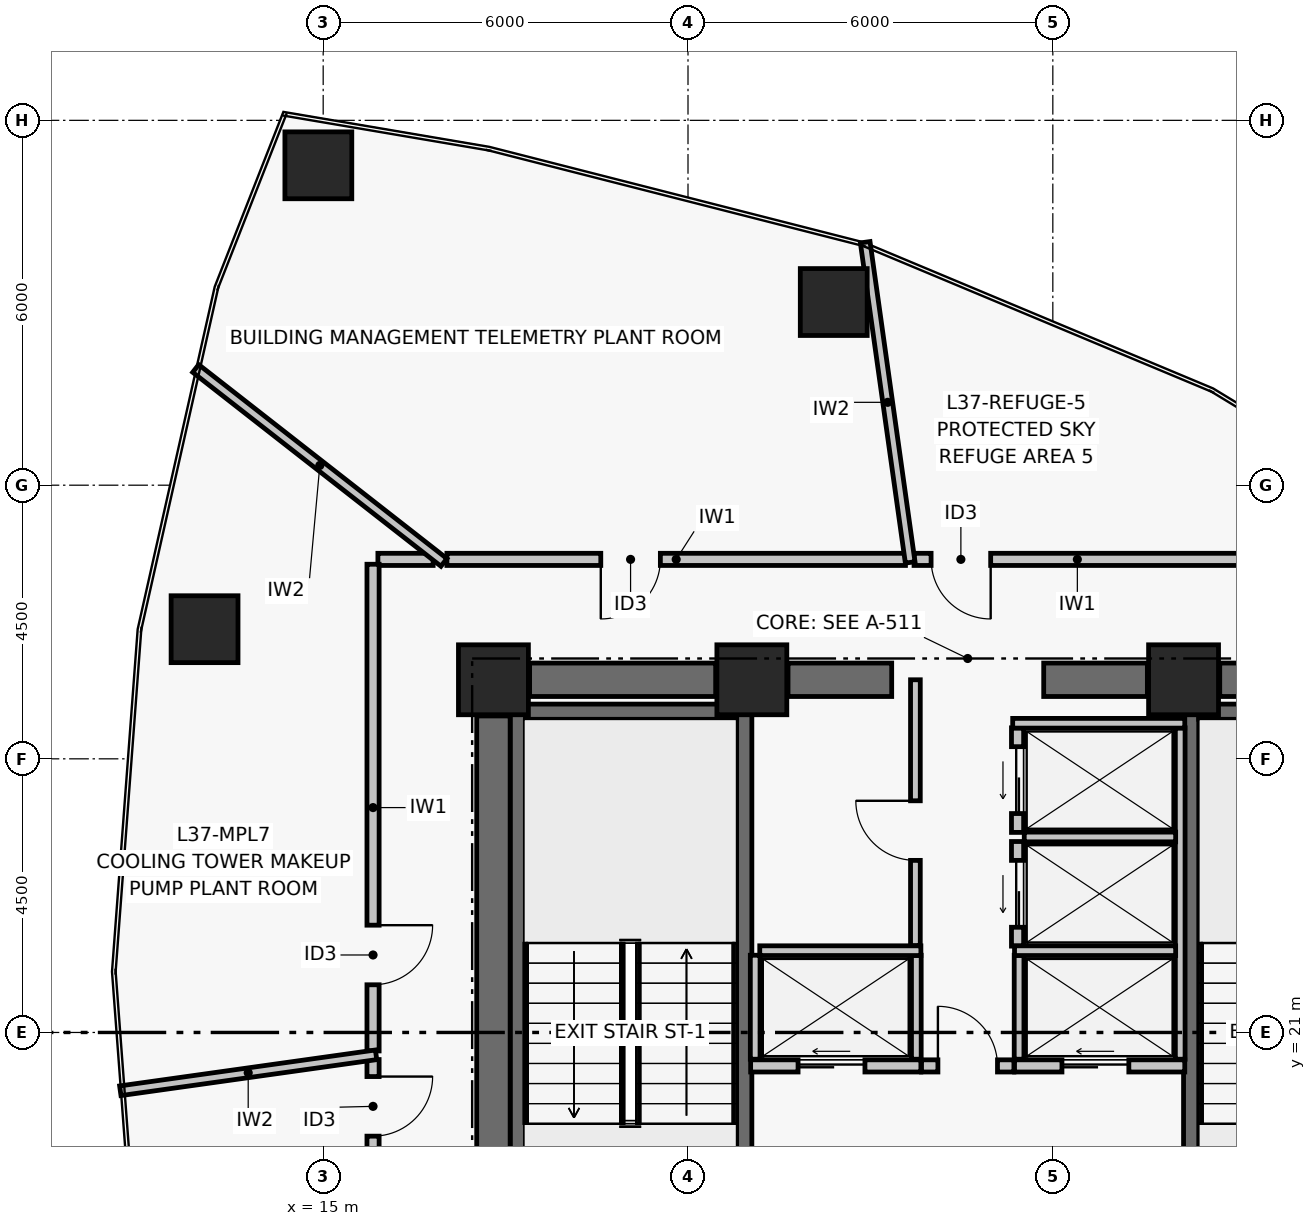
"""IFC4 building model, lengths in metres.
Left out: names, types, materials, properties, quantities, classifications, styles, units other than length and angle.
Written with IfcOpenShell. Run it as: python <this file> out.ifc"""

import sys

from ifc_helpers import new_model, si_unit, direction, frame, frame_2d, origin, origin_2d, place, context, subcontext, project, spatial, rectangle, hollow_rectangle, extrude, element, fill, save


model = new_model("IFC4")
c1 = context("Model", 3, precision=1e-05, world=origin(), true_north=direction((0.0, 1.0)))
c2 = subcontext(c1, "Body", "Model", "MODEL_VIEW")
j1 = project(units=[si_unit("LENGTHUNIT", "METRE"), si_unit("PLANEANGLEUNIT", "RADIAN")], contexts=[c1])
p1 = place(None, origin())
s1 = spatial("IfcSite", under=j1, at=p1, CompositionType="ELEMENT")
p2 = place(p1, origin())
s2 = spatial("IfcBuilding", under=s1, at=p2, CompositionType="ELEMENT")
p3 = place(p2, frame((0.0, 0.0, 148.62)))
s3 = spatial("IfcBuildingStorey", under=s2, at=p3, CompositionType="ELEMENT", Elevation=148.62)
for number, where, z_axis, x_axis in (
    (1, (17.8, 26.8, 0.0), (0.0, 0.0, 1.0), (1.0, 0.0, 0.0)),
    (2, (22.05, 26.8, 0.0), (0.0, 0.0, 1.0), (1.0, 0.0, 0.0)),
    (3, (29.15, 26.8, 0.0), (0.0, 0.0, 1.0), (1.0, 0.0, 0.0)),
):
    element("IfcColumn", number, at=place(p3, frame(where, z_axis=z_axis, x_axis=x_axis)), inside=s3, PredefinedType="COLUMN", context=c2, shape_type="SweptSolid", body=[
        extrude(rectangle(XDim=1.15, YDim=1.15, at=origin_2d()), origin(), (0.0, 0.0, 1.0), 5.7),
    ])
p4 = place(p3, frame((18.395, 26.8, 0.0), z_axis=(0.0, 0.0, 1.0), x_axis=(1.0, 0.0, 0.0)))
e4 = element("IfcWall", 4, at=p4, inside=s3, PredefinedType="SHEAR", context=c2, shape_type="SweptSolid", body=[
    extrude(rectangle(XDim=3.06, YDim=0.55, at=frame_2d((1.53, 0.0))), origin(), (0.0, 0.0, 1.0), 5.42),
])
p5 = place(p3, frame((22.645, 26.8, 0.0), z_axis=(0.0, 0.0, 1.0), x_axis=(1.0, 0.0, 0.0)))
e5 = element("IfcWall", 5, at=p5, inside=s3, PredefinedType="SHEAR", context=c2, shape_type="SweptSolid", body=[
    extrude(rectangle(XDim=1.705, YDim=0.55, at=frame_2d((0.853, 0.0))), origin(), (0.0, 0.0, 1.0), 5.42),
])
p6 = place(p3, frame((26.85, 26.8, 0.0), z_axis=(0.0, 0.0, 1.0), x_axis=(1.0, 0.0, 0.0)))
e6 = element("IfcWall", 6, at=p6, inside=s3, PredefinedType="SHEAR", context=c2, shape_type="SweptSolid", body=[
    extrude(rectangle(XDim=1.705, YDim=0.55, at=frame_2d((0.853, 0.0))), origin(), (0.0, 0.0, 1.0), 5.42),
])
p7 = place(p3, frame((29.745, 26.8, 0.0), z_axis=(0.0, 0.0, 1.0), x_axis=(1.0, 0.0, 0.0)))
e7 = element("IfcWall", 7, at=p7, inside=s3, PredefinedType="SHEAR", context=c2, shape_type="SweptSolid", body=[
    extrude(rectangle(XDim=3.06, YDim=0.55, at=frame_2d((1.53, 0.0))), origin(), (0.0, 0.0, 1.0), 5.42),
])
p8 = place(p3, frame((17.8, 17.795, 0.0), z_axis=(0.0, 0.0, 1.0), x_axis=(0.0, 1.0, 0.0)))
e8 = element("IfcWall", 8, at=p8, inside=s3, PredefinedType="SHEAR", context=c2, shape_type="SweptSolid", body=[
    extrude(rectangle(XDim=8.41, YDim=0.55, at=frame_2d((4.205, 0.0))), origin(), (0.0, 0.0, 1.0), 5.42),
])
p9 = place(p3, frame((18.204, 17.6, 0.0), z_axis=(0.0, 0.0, 1.0), x_axis=(0.0, 1.0, 0.0)))
e9 = element("IfcWall", 9, at=p9, inside=s3, PredefinedType="SHEAR", context=c2, shape_type="SweptSolid", body=[
    extrude(rectangle(XDim=8.8, YDim=0.25, at=frame_2d((4.4, 0.0))), origin(), (0.0, 0.0, 1.0), 5.42),
])
p10 = place(p3, frame((21.925, 17.6, 0.0), z_axis=(0.0, 0.0, 1.0), x_axis=(0.0, 1.0, 0.0)))
e10 = element("IfcWall", 10, at=p10, inside=s3, PredefinedType="SHEAR", context=c2, shape_type="SweptSolid", body=[
    extrude(rectangle(XDim=8.8, YDim=0.25, at=frame_2d((4.4, 0.0))), origin(), (0.0, 0.0, 1.0), 5.42),
])
p11 = place(p10, frame((0.35, 0.0, 0.0)))
e11 = element("IfcOpeningElement", 11, at=p11, cuts=e10, PredefinedType="OPENING", context=c2, shape_type="SweptSolid", body=[
    extrude(rectangle(XDim=1.05, YDim=2.08, at=frame_2d((0.525, 1.04))), frame((0.0, 0.135, 0.0), z_axis=(0.0, -1.0, 0.0), x_axis=(1.0, 0.0, 0.0)), (0.0, 0.0, 1.0), 0.27),
])
p12 = place(p3, frame((18.329, 26.275, 0.0), z_axis=(0.0, 0.0, 1.0), x_axis=(1.0, 0.0, 0.0)))
e12 = element("IfcWall", 12, at=p12, inside=s3, PredefinedType="SHEAR", context=c2, shape_type="SweptSolid", body=[
    extrude(rectangle(XDim=3.471, YDim=0.25, at=frame_2d((1.735, 0.0))), origin(), (0.0, 0.0, 1.0), 5.42),
])
p13 = place(p3, frame((29.275, 17.6, 0.0), z_axis=(0.0, 0.0, 1.0), x_axis=(0.0, 1.0, 0.0)))
e13 = element("IfcWall", 13, at=p13, inside=s3, PredefinedType="SHEAR", context=c2, shape_type="SweptSolid", body=[
    extrude(rectangle(XDim=8.8, YDim=0.25, at=frame_2d((4.4, 0.0))), origin(), (0.0, 0.0, 1.0), 5.42),
])
p14 = place(p13, frame((0.35, 0.0, 0.0)))
e14 = element("IfcOpeningElement", 14, at=p14, cuts=e13, PredefinedType="OPENING", context=c2, shape_type="SweptSolid", body=[
    extrude(rectangle(XDim=1.05, YDim=2.08, at=frame_2d((0.525, 1.04))), frame((0.0, 0.135, 0.0), z_axis=(0.0, -1.0, 0.0), x_axis=(1.0, 0.0, 0.0)), (0.0, 0.0, 1.0), 0.27),
])
p15 = place(p3, frame((29.4, 26.275, 0.0), z_axis=(0.0, 0.0, 1.0), x_axis=(1.0, 0.0, 0.0)))
e15 = element("IfcWall", 15, at=p15, inside=s3, PredefinedType="SHEAR", context=c2, shape_type="SweptSolid", body=[
    extrude(rectangle(XDim=3.471, YDim=0.25, at=frame_2d((1.736, 0.0))), origin(), (0.0, 0.0, 1.0), 5.42),
])
for number, where, z_axis, x_axis in (
    (16, (23.397, 33.012, 0.0), (0.0, 0.0, 1.0), (1.0, 0.0, 0.0)),
    (17, (14.92, 35.26, 0.0), (0.0, 0.0, 1.0), (1.0, 0.0, 0.0)),
    (18, (13.049, 27.632, 0.0), (0.0, 0.0, 1.0), (1.0, 0.0, 0.0)),
):
    element("IfcColumn", number, at=place(p3, frame(where, z_axis=z_axis, x_axis=x_axis)), inside=s3, PredefinedType="COLUMN", context=c2, shape_type="SweptSolid", body=[
        extrude(hollow_rectangle(XDim=1.1, YDim=1.1, WallThickness=0.045, at=origin_2d()), origin(), (0.0, 0.0, 1.0), 5.7),
    ])
p16 = place(p3, frame((24.84, 20.45, 0.0), z_axis=(0.0, 0.0, 1.0), x_axis=(1.0, 0.0, 0.0)))
e19 = element("IfcWall", 19, at=p16, inside=s3, PredefinedType="PARTITIONING", context=c2, shape_type="SweptSolid", body=[
    extrude(rectangle(XDim=1.52, YDim=0.2, at=frame_2d((0.76, 0.0))), origin(), (0.0, 0.0, 1.0), 5.42),
])
p17 = place(p16, frame((0.27, 0.0, 0.0)))
e20 = element("IfcOpeningElement", 20, at=p17, cuts=e19, PredefinedType="OPENING", context=c2, shape_type="SweptSolid", body=[
    extrude(rectangle(XDim=0.98, YDim=2.06, at=frame_2d((0.49, 1.03))), frame((0.0, 0.11, 0.0), z_axis=(0.0, -1.0, 0.0), x_axis=(1.0, 0.0, 0.0)), (0.0, 0.0, 1.0), 0.22),
])
p18 = place(p3, frame((22.03, 20.45, 0.0), z_axis=(0.0, 0.0, 1.0), x_axis=(1.0, 0.0, 0.0)))
e21 = element("IfcWall", 21, at=p18, inside=s3, PredefinedType="PARTITIONING", context=c2, shape_type="SweptSolid", body=[
    extrude(rectangle(XDim=2.8, YDim=0.2, at=frame_2d((1.4, 0.0))), origin(), (0.0, 0.0, 1.0), 5.42),
])
p19 = place(p18, frame((0.78, 0.0, 0.0)))
e22 = element("IfcOpeningElement", 22, at=p19, cuts=e21, PredefinedType="OPENING", context=c2, shape_type="SweptSolid", body=[
    extrude(rectangle(XDim=1.1, YDim=2.08, at=frame_2d((0.55, 1.04))), frame((0.0, 0.11, 0.0), z_axis=(0.0, -1.0, 0.0), x_axis=(1.0, 0.0, 0.0)), (0.0, 0.0, 1.0), 0.22),
])
p20 = place(p3, frame((26.37, 20.45, 0.0), z_axis=(0.0, 0.0, 1.0), x_axis=(1.0, 0.0, 0.0)))
e23 = element("IfcWall", 23, at=p20, inside=s3, PredefinedType="PARTITIONING", context=c2, shape_type="SweptSolid", body=[
    extrude(rectangle(XDim=2.8, YDim=0.2, at=frame_2d((1.4, 0.0))), origin(), (0.0, 0.0, 1.0), 5.42),
])
p21 = place(p20, frame((0.78, 0.0, 0.0)))
e24 = element("IfcOpeningElement", 24, at=p21, cuts=e23, PredefinedType="OPENING", context=c2, shape_type="SweptSolid", body=[
    extrude(rectangle(XDim=1.1, YDim=2.08, at=frame_2d((0.55, 1.04))), frame((0.0, 0.11, 0.0), z_axis=(0.0, -1.0, 0.0), x_axis=(1.0, 0.0, 0.0)), (0.0, 0.0, 1.0), 0.22),
])
p22 = place(p3, frame((26.42, 22.42, 0.0), z_axis=(0.0, 0.0, 1.0), x_axis=(0.0, 1.0, 0.0)))
e25 = element("IfcWall", 25, at=p22, inside=s3, PredefinedType="PARTITIONING", context=c2, shape_type="SweptSolid", body=[
    extrude(rectangle(XDim=1.72, YDim=0.2, at=frame_2d((0.86, 0.0))), origin(), (0.0, 0.0, 1.0), 5.42),
])
p23 = place(p22, frame((0.31, 0.0, 0.0)))
e26 = element("IfcOpeningElement", 26, at=p23, cuts=e25, PredefinedType="OPENING", context=c2, shape_type="SweptSolid", body=[
    extrude(rectangle(XDim=1.1, YDim=2.08, at=frame_2d((0.55, 1.04))), frame((0.0, 0.11, 0.0), z_axis=(0.0, -1.0, 0.0), x_axis=(1.0, 0.0, 0.0)), (0.0, 0.0, 1.0), 0.22),
])
p24 = place(p3, frame((26.42, 24.29, 0.0), z_axis=(0.0, 0.0, 1.0), x_axis=(0.0, 1.0, 0.0)))
e27 = element("IfcWall", 27, at=p24, inside=s3, PredefinedType="PARTITIONING", context=c2, shape_type="SweptSolid", body=[
    extrude(rectangle(XDim=1.72, YDim=0.2, at=frame_2d((0.86, 0.0))), origin(), (0.0, 0.0, 1.0), 5.42),
])
p25 = place(p24, frame((0.31, 0.0, 0.0)))
e28 = element("IfcOpeningElement", 28, at=p25, cuts=e27, PredefinedType="OPENING", context=c2, shape_type="SweptSolid", body=[
    extrude(rectangle(XDim=1.1, YDim=2.08, at=frame_2d((0.55, 1.04))), frame((0.0, 0.11, 0.0), z_axis=(0.0, -1.0, 0.0), x_axis=(1.0, 0.0, 0.0)), (0.0, 0.0, 1.0), 0.22),
])
for number, where, z_axis, x_axis in (
    (29, (22.105, 20.56, 0.0), (0.0, 0.0, 1.0), (0.0, 1.0, 0.0)),
    (30, (24.755, 20.56, 0.0), (0.0, 0.0, 1.0), (0.0, 1.0, 0.0)),
):
    element("IfcWall", number, at=place(p3, frame(where, z_axis=z_axis, x_axis=x_axis)), inside=s3, PredefinedType="PARTITIONING", context=c2, shape_type="SweptSolid", body=[
        extrude(rectangle(XDim=1.71, YDim=0.16, at=frame_2d((0.855, 0.0))), origin(), (0.0, 0.0, 1.0), 5.42),
    ])
p26 = place(p3, frame((22.18, 22.345, 0.0), z_axis=(0.0, 0.0, 1.0), x_axis=(1.0, 0.0, 0.0)))
e31 = element("IfcWall", 31, at=p26, inside=s3, PredefinedType="PARTITIONING", context=c2, shape_type="SweptSolid", body=[
    extrude(rectangle(XDim=2.65, YDim=0.16, at=frame_2d((1.325, 0.0))), origin(), (0.0, 0.0, 1.0), 5.42),
])
p27 = place(p3, frame((29.095, 20.56, 0.0), z_axis=(0.0, 0.0, 1.0), x_axis=(0.0, 1.0, 0.0)))
e32 = element("IfcWall", 32, at=p27, inside=s3, PredefinedType="PARTITIONING", context=c2, shape_type="SweptSolid", body=[
    extrude(rectangle(XDim=5.45, YDim=0.16, at=frame_2d((2.725, 0.0))), origin(), (0.0, 0.0, 1.0), 5.42),
])
p28 = place(p3, frame((26.445, 20.56, 0.0), z_axis=(0.0, 0.0, 1.0), x_axis=(0.0, 1.0, 0.0)))
e33 = element("IfcWall", 33, at=p28, inside=s3, PredefinedType="PARTITIONING", context=c2, shape_type="SweptSolid", body=[
    extrude(rectangle(XDim=1.71, YDim=0.16, at=frame_2d((0.855, 0.0))), origin(), (0.0, 0.0, 1.0), 5.42),
])
p29 = place(p3, frame((26.37, 22.345, 0.0), z_axis=(0.0, 0.0, 1.0), x_axis=(1.0, 0.0, 0.0)))
e34 = element("IfcWall", 34, at=p29, inside=s3, PredefinedType="PARTITIONING", context=c2, shape_type="SweptSolid", body=[
    extrude(rectangle(XDim=2.65, YDim=0.16, at=frame_2d((1.325, 0.0))), origin(), (0.0, 0.0, 1.0), 5.42),
])
p30 = place(p3, frame((26.53, 24.215, 0.0), z_axis=(0.0, 0.0, 1.0), x_axis=(1.0, 0.0, 0.0)))
e35 = element("IfcWall", 35, at=p30, inside=s3, PredefinedType="PARTITIONING", context=c2, shape_type="SweptSolid", body=[
    extrude(rectangle(XDim=2.49, YDim=0.16, at=frame_2d((1.245, 0.0))), origin(), (0.0, 0.0, 1.0), 5.42),
])
p31 = place(p3, frame((26.34, 26.085, 0.0), z_axis=(0.0, 0.0, 1.0), x_axis=(1.0, 0.0, 0.0)))
e36 = element("IfcWall", 36, at=p31, inside=s3, PredefinedType="PARTITIONING", context=c2, shape_type="SweptSolid", body=[
    extrude(rectangle(XDim=2.83, YDim=0.16, at=frame_2d((1.415, 0.0))), origin(), (0.0, 0.0, 1.0), 5.42),
])
p32 = place(p3, frame((24.74, 22.43, 0.0), z_axis=(0.0, 0.0, 1.0), x_axis=(0.0, 1.0, 0.0)))
e37 = element("IfcWall", 37, at=p32, inside=s3, PredefinedType="PARTITIONING", context=c2, shape_type="SweptSolid", body=[
    extrude(rectangle(XDim=4.37, YDim=0.16, at=frame_2d((2.185, 0.0))), origin(), (0.0, 0.0, 1.0), 4.55),
])
p33 = place(p32, frame((1.4, 0.0, 0.0)))
e38 = element("IfcOpeningElement", 38, at=p33, cuts=e37, PredefinedType="OPENING", context=c2, shape_type="SweptSolid", body=[
    extrude(rectangle(XDim=0.98, YDim=2.06, at=frame_2d((0.49, 1.03))), frame((0.0, 0.09, 0.0), z_axis=(0.0, -1.0, 0.0), x_axis=(1.0, 0.0, 0.0)), (0.0, 0.0, 1.0), 0.18),
])
p34 = place(p3, frame((15.82, 20.555, 0.0), z_axis=(0.0, 0.0, 1.0), x_axis=(0.0, -1.0, 0.0)))
e39 = element("IfcWall", 39, at=p34, inside=s3, PredefinedType="PARTITIONING", context=c2, shape_type="SweptSolid", body=[
    extrude(rectangle(XDim=5.255, YDim=0.2, at=frame_2d((2.627, 0.0))), origin(), (0.0, 0.0, 1.0), 4.15),
])
p35 = place(p34, frame((0.28, 0.0, 0.0)))
e40 = element("IfcOpeningElement", 40, at=p35, cuts=e39, PredefinedType="OPENING", context=c2, shape_type="SweptSolid", body=[
    extrude(rectangle(XDim=0.98, YDim=2.06, at=frame_2d((0.49, 1.03))), frame((0.0, 0.11, 0.0), z_axis=(0.0, -1.0, 0.0), x_axis=(1.0, 0.0, 0.0)), (0.0, 0.0, 1.0), 0.22),
])
p36 = place(p3, frame((30.089, 28.78, 0.0), z_axis=(0.0, 0.0, 1.0), x_axis=(-1.0, 0.0, 0.0)))
e41 = element("IfcWall", 41, at=p36, inside=s3, PredefinedType="PARTITIONING", context=c2, shape_type="SweptSolid", body=[
    extrude(rectangle(XDim=5.371, YDim=0.2, at=frame_2d((2.686, 0.0))), origin(), (0.0, 0.0, 1.0), 4.85),
])
p37 = place(p36, frame((4.111, 0.0, 0.0)))
e42 = element("IfcOpeningElement", 42, at=p37, cuts=e41, PredefinedType="OPENING", context=c2, shape_type="SweptSolid", body=[
    extrude(rectangle(XDim=0.98, YDim=2.06, at=frame_2d((0.49, 1.03))), frame((0.0, 0.11, 0.0), z_axis=(0.0, -1.0, 0.0), x_axis=(1.0, 0.0, 0.0)), (0.0, 0.0, 1.0), 0.22),
])
p38 = place(p3, frame((24.576, 28.78, 0.0), z_axis=(0.0, 0.0, 1.0), x_axis=(-1.0, 0.0, 0.0)))
e43 = element("IfcWall", 43, at=p38, inside=s3, PredefinedType="PARTITIONING", context=c2, shape_type="SweptSolid", body=[
    extrude(rectangle(XDim=7.542, YDim=0.2, at=frame_2d((3.771, 0.0))), origin(), (0.0, 0.0, 1.0), 4.15),
])
p39 = place(p38, frame((4.031, 0.0, 0.0)))
e44 = element("IfcOpeningElement", 44, at=p39, cuts=e43, PredefinedType="OPENING", context=c2, shape_type="SweptSolid", body=[
    extrude(rectangle(XDim=0.98, YDim=2.06, at=frame_2d((0.49, 1.03))), frame((0.0, 0.11, 0.0), z_axis=(0.0, -1.0, 0.0), x_axis=(1.0, 0.0, 0.0)), (0.0, 0.0, 1.0), 0.22),
])
p40 = place(p3, frame((16.808, 28.78, 0.0), z_axis=(0.0, 0.0, 1.0), x_axis=(-1.0, 0.0, 0.0)))
e45 = element("IfcWall", 45, at=p40, inside=s3, PredefinedType="PARTITIONING", context=c2, shape_type="SweptSolid", body=[
    extrude(rectangle(XDim=0.908, YDim=0.2, at=frame_2d((0.454, 0.0))), origin(), (0.0, 0.0, 1.0), 4.15),
])
p41 = place(p3, frame((15.82, 28.7, 0.0), z_axis=(0.0, 0.0, 1.0), x_axis=(0.0, -1.0, 0.0)))
e46 = element("IfcWall", 46, at=p41, inside=s3, PredefinedType="PARTITIONING", context=c2, shape_type="SweptSolid", body=[
    extrude(rectangle(XDim=8.004, YDim=0.2, at=frame_2d((4.002, 0.0))), origin(), (0.0, 0.0, 1.0), 4.15),
])
p42 = place(p41, frame((5.936, 0.0, 0.0)))
e47 = element("IfcOpeningElement", 47, at=p42, cuts=e46, PredefinedType="OPENING", context=c2, shape_type="SweptSolid", body=[
    extrude(rectangle(XDim=0.98, YDim=2.06, at=frame_2d((0.49, 1.03))), frame((0.0, 0.11, 0.0), z_axis=(0.0, -1.0, 0.0), x_axis=(1.0, 0.0, 0.0)), (0.0, 0.0, 1.0), 0.22),
])
p43 = place(p3, frame((24.654, 28.73, 0.0), z_axis=(0.0, 0.0, 1.0), x_axis=(-0.139209808081, 0.990262909198, 0.0)))
e48 = element("IfcWall", 48, at=p43, inside=s3, PredefinedType="PARTITIONING", context=c2, shape_type="SweptSolid", body=[
    extrude(rectangle(XDim=5.317, YDim=0.16, at=frame_2d((2.659, 0.0))), origin(), (0.0, 0.0, 1.0), 4.85),
])
p44 = place(p3, frame((16.986, 28.73, 0.0), z_axis=(0.0, 0.0, 1.0), x_axis=(-0.788002940382, 0.615671475666, 0.0)))
e49 = element("IfcWall", 49, at=p44, inside=s3, PredefinedType="PARTITIONING", context=c2, shape_type="SweptSolid", body=[
    extrude(rectangle(XDim=5.181, YDim=0.16, at=frame_2d((2.59, 0.0))), origin(), (0.0, 0.0, 1.0), 4.15),
])
p45 = place(p3, frame((15.87, 20.633, 0.0), z_axis=(0.0, 0.0, 1.0), x_axis=(-0.990272175973, -0.139143873362, 0.0)))
e50 = element("IfcWall", 50, at=p45, inside=s3, PredefinedType="PARTITIONING", context=c2, shape_type="SweptSolid", body=[
    extrude(rectangle(XDim=4.248, YDim=0.16, at=frame_2d((2.124, 0.0))), origin(), (0.0, 0.0, 1.0), 4.85),
])
p46 = place(p17, origin())
e51 = element("IfcDoor", 51, at=p46, inside=s3, OperationType="SINGLE_SWING_LEFT", PredefinedType="DOOR", context=c2, shape_type="SweptSolid", body=[
    extrude(rectangle(XDim=0.98, YDim=2.06, at=frame_2d((0.49, 1.03))), frame((0.0, 0.025, 0.0), z_axis=(0.0, -1.0, 0.0), x_axis=(1.0, 0.0, 0.0)), (0.0, 0.0, 1.0), 0.05),
])
fill(e20, e51)
p47 = place(p19, origin())
e52 = element("IfcDoor", 52, at=p47, inside=s3, OperationType="DOUBLE_DOOR_SLIDING", PredefinedType="DOOR", context=c2, shape_type="SweptSolid", body=[
    extrude(rectangle(XDim=1.1, YDim=2.08, at=frame_2d((0.55, 1.04))), frame((0.0, 0.025, 0.0), z_axis=(0.0, -1.0, 0.0), x_axis=(1.0, 0.0, 0.0)), (0.0, 0.0, 1.0), 0.05),
])
fill(e22, e52)
p48 = place(p21, origin())
e53 = element("IfcDoor", 53, at=p48, inside=s3, OperationType="DOUBLE_DOOR_SLIDING", PredefinedType="DOOR", context=c2, shape_type="SweptSolid", body=[
    extrude(rectangle(XDim=1.1, YDim=2.08, at=frame_2d((0.55, 1.04))), frame((0.0, 0.025, 0.0), z_axis=(0.0, -1.0, 0.0), x_axis=(1.0, 0.0, 0.0)), (0.0, 0.0, 1.0), 0.05),
])
fill(e24, e53)
p49 = place(p23, origin())
e54 = element("IfcDoor", 54, at=p49, inside=s3, OperationType="DOUBLE_DOOR_SLIDING", PredefinedType="DOOR", context=c2, shape_type="SweptSolid", body=[
    extrude(rectangle(XDim=1.1, YDim=2.08, at=frame_2d((0.55, 1.04))), frame((0.0, 0.025, 0.0), z_axis=(0.0, -1.0, 0.0), x_axis=(1.0, 0.0, 0.0)), (0.0, 0.0, 1.0), 0.05),
])
fill(e26, e54)
p50 = place(p25, origin())
e55 = element("IfcDoor", 55, at=p50, inside=s3, OperationType="DOUBLE_DOOR_SLIDING", PredefinedType="DOOR", context=c2, shape_type="SweptSolid", body=[
    extrude(rectangle(XDim=1.1, YDim=2.08, at=frame_2d((0.55, 1.04))), frame((0.0, 0.025, 0.0), z_axis=(0.0, -1.0, 0.0), x_axis=(1.0, 0.0, 0.0)), (0.0, 0.0, 1.0), 0.05),
])
fill(e28, e55)
p51 = place(p33, origin())
e56 = element("IfcDoor", 56, at=p51, inside=s3, OperationType="SINGLE_SWING_RIGHT", PredefinedType="DOOR", context=c2, shape_type="SweptSolid", body=[
    extrude(rectangle(XDim=0.98, YDim=2.06, at=frame_2d((0.49, 1.03))), frame((0.0, 0.025, 0.0), z_axis=(0.0, -1.0, 0.0), x_axis=(1.0, 0.0, 0.0)), (0.0, 0.0, 1.0), 0.05),
])
fill(e38, e56)
p52 = place(p35, origin())
e57 = element("IfcDoor", 57, at=p52, inside=s3, OperationType="SINGLE_SWING_LEFT", PredefinedType="DOOR", context=c2, shape_type="SweptSolid", body=[
    extrude(rectangle(XDim=0.98, YDim=2.06, at=frame_2d((0.49, 1.03))), frame((0.0, 0.025, 0.0), z_axis=(0.0, -1.0, 0.0), x_axis=(1.0, 0.0, 0.0)), (0.0, 0.0, 1.0), 0.05),
])
fill(e40, e57)
p53 = place(p37, origin())
e58 = element("IfcDoor", 58, at=p53, inside=s3, OperationType="SINGLE_SWING_LEFT", PredefinedType="DOOR", context=c2, shape_type="SweptSolid", body=[
    extrude(rectangle(XDim=0.98, YDim=2.06, at=frame_2d((0.49, 1.03))), frame((0.0, 0.025, 0.0), z_axis=(0.0, -1.0, 0.0), x_axis=(1.0, 0.0, 0.0)), (0.0, 0.0, 1.0), 0.05),
])
fill(e42, e58)
p54 = place(p39, origin())
e59 = element("IfcDoor", 59, at=p54, inside=s3, OperationType="SINGLE_SWING_RIGHT", PredefinedType="DOOR", context=c2, shape_type="SweptSolid", body=[
    extrude(rectangle(XDim=0.98, YDim=2.06, at=frame_2d((0.49, 1.03))), frame((0.0, 0.025, 0.0), z_axis=(0.0, -1.0, 0.0), x_axis=(1.0, 0.0, 0.0)), (0.0, 0.0, 1.0), 0.05),
])
fill(e44, e59)
p55 = place(p42, origin())
e60 = element("IfcDoor", 60, at=p55, inside=s3, OperationType="SINGLE_SWING_LEFT", PredefinedType="DOOR", context=c2, shape_type="SweptSolid", body=[
    extrude(rectangle(XDim=0.98, YDim=2.06, at=frame_2d((0.49, 1.03))), frame((0.0, 0.025, 0.0), z_axis=(0.0, -1.0, 0.0), x_axis=(1.0, 0.0, 0.0)), (0.0, 0.0, 1.0), 0.05),
])
fill(e47, e60)
save(model, sys.argv[1])
